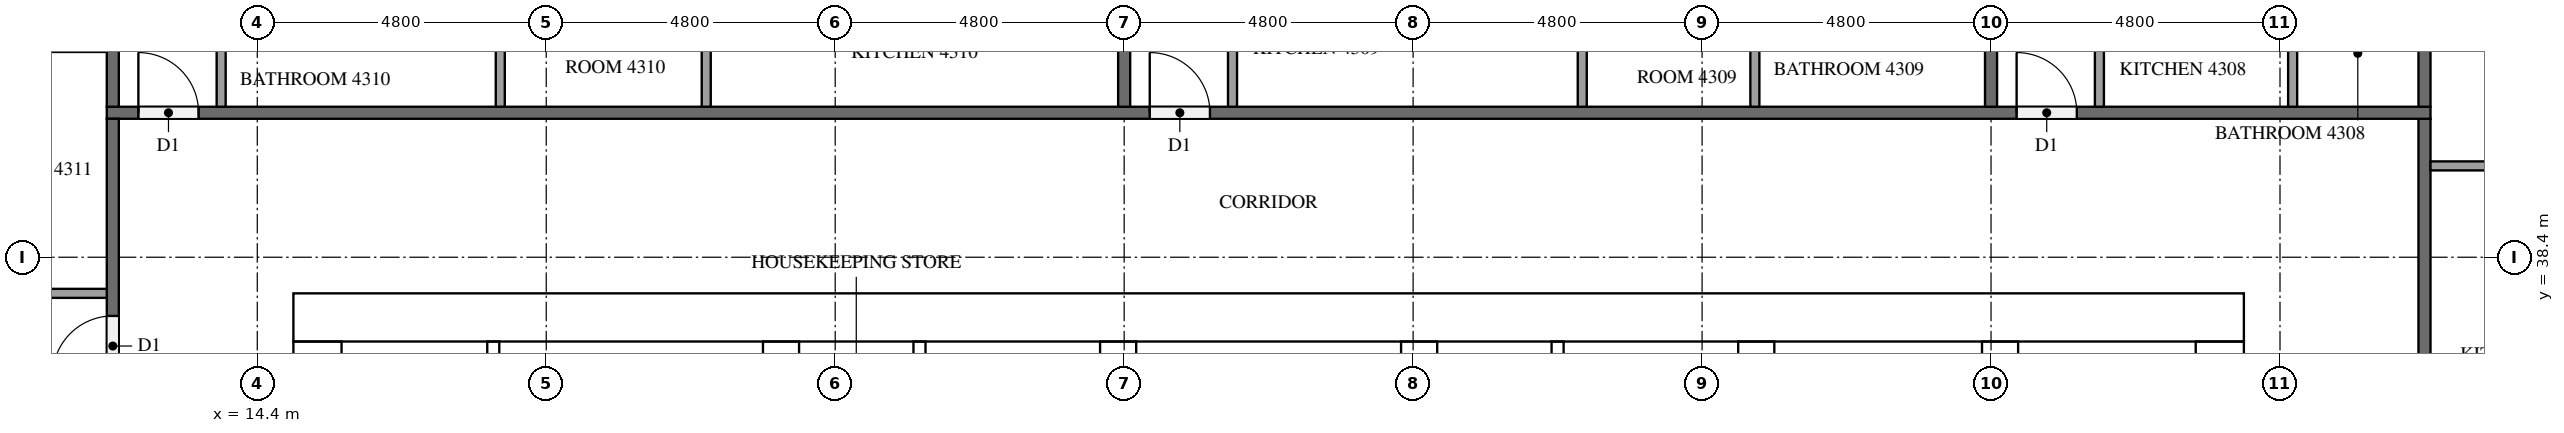
"""IFC4 building model, lengths in metres.
Left out: names, types, materials, properties, quantities, classifications, styles, units other than length and angle.
Written with IfcOpenShell. Run it as: python <this file> out.ifc"""

import sys

from ifc_helpers import new_model, si_unit, direction, frame, frame_2d, origin, place, context, subcontext, project, spatial, rectangle, extrude, element, fill, save


model = new_model("IFC4")
c1 = context("Model", 3, precision=1e-05, world=origin(), true_north=direction((0.0, 1.0)))
c2 = subcontext(c1, "Body", "Model", "MODEL_VIEW")
j1 = project(units=[si_unit("LENGTHUNIT", "METRE"), si_unit("PLANEANGLEUNIT", "RADIAN")], contexts=[c1])
p1 = place(None, origin())
s1 = spatial("IfcSite", under=j1, at=p1, CompositionType="ELEMENT")
p2 = place(p1, origin())
s2 = spatial("IfcBuilding", under=s1, at=p2, CompositionType="ELEMENT")
p3 = place(p2, frame((0.0, 0.0, 166.5)))
s3 = spatial("IfcBuildingStorey", under=s2, at=p3, CompositionType="ELEMENT", Elevation=166.5)
p4 = place(p3, frame((15.0, 37.4, 0.0), z_axis=(0.0, 0.0, 1.0), x_axis=(1.0, 0.0, 0.0)))
e1 = element("IfcWall", 1, at=p4, inside=s3, PredefinedType="SHEAR", context=c2, shape_type="SweptSolid", body=[
    extrude(rectangle(XDim=32.4, YDim=0.8, at=frame_2d((16.2, 0.0))), origin(), (0.0, 0.0, 1.0), 3.2),
])
p5 = place(p4, frame((15.3, 0.0, 0.0)))
e2 = element("IfcOpeningElement", 2, at=p5, cuts=e1, PredefinedType="OPENING", context=c2, shape_type="SweptSolid", body=[
    extrude(rectangle(XDim=1.8, YDim=2.1, at=frame_2d((0.9, 1.05))), frame((0.0, 0.41, 0.0), z_axis=(0.0, -1.0, 0.0), x_axis=(1.0, 0.0, 0.0)), (0.0, 0.0, 1.0), 0.82),
])
p6 = place(p4, frame((1.51, 0.0, 0.0)))
e3 = element("IfcOpeningElement", 3, at=p6, cuts=e1, PredefinedType="OPENING", context=c2, shape_type="SweptSolid", body=[
    extrude(rectangle(XDim=1.0, YDim=2.1, at=frame_2d((0.5, 1.05))), frame((0.0, 0.41, 0.0), z_axis=(0.0, -1.0, 0.0), x_axis=(1.0, 0.0, 0.0)), (0.0, 0.0, 1.0), 0.82),
])
p7 = place(p4, frame((5.11, 0.0, 0.0)))
e4 = element("IfcOpeningElement", 4, at=p7, cuts=e1, PredefinedType="OPENING", context=c2, shape_type="SweptSolid", body=[
    extrude(rectangle(XDim=1.0, YDim=2.1, at=frame_2d((0.5, 1.05))), frame((0.0, 0.41, 0.0), z_axis=(0.0, -1.0, 0.0), x_axis=(1.0, 0.0, 0.0)), (0.0, 0.0, 1.0), 0.82),
])
p8 = place(p3, frame((15.4, 15.8, 0.0), z_axis=(0.0, 0.0, 1.0), x_axis=(0.0, 1.0, 0.0)))
e5 = element("IfcWall", 5, at=p8, inside=s3, PredefinedType="SHEAR", context=c2, shape_type="SweptSolid", body=[
    extrude(rectangle(XDim=21.2, YDim=0.8, at=frame_2d((10.6, 0.0))), origin(), (0.0, 0.0, 1.0), 3.2),
])
p9 = place(p8, frame((4.96, 0.0, 0.0)))
e6 = element("IfcOpeningElement", 6, at=p9, cuts=e5, PredefinedType="OPENING", context=c2, shape_type="SweptSolid", body=[
    extrude(rectangle(XDim=1.2, YDim=2.1, at=frame_2d((0.6, 1.05))), frame((0.0, 0.41, 0.0), z_axis=(0.0, -1.0, 0.0), x_axis=(1.0, 0.0, 0.0)), (0.0, 0.0, 1.0), 0.82),
])
p10 = place(p3, frame((47.0, 15.8, 0.0), z_axis=(0.0, 0.0, 1.0), x_axis=(0.0, 1.0, 0.0)))
e7 = element("IfcWall", 7, at=p10, inside=s3, PredefinedType="SHEAR", context=c2, shape_type="SweptSolid", body=[
    extrude(rectangle(XDim=21.2, YDim=0.8, at=frame_2d((10.6, 0.0))), origin(), (0.0, 0.0, 1.0), 3.2),
])
p11 = place(p10, frame((10.3, 0.0, 0.0)))
e8 = element("IfcOpeningElement", 8, at=p11, cuts=e7, PredefinedType="OPENING", context=c2, shape_type="SweptSolid", body=[
    extrude(rectangle(XDim=1.2, YDim=2.1, at=frame_2d((0.6, 1.05))), frame((0.0, 0.41, 0.0), z_axis=(0.0, -1.0, 0.0), x_axis=(1.0, 0.0, 0.0)), (0.0, 0.0, 1.0), 0.82),
])
p12 = place(p3, frame((23.1, 15.8, 0.0), z_axis=(0.0, 0.0, 1.0), x_axis=(0.0, 1.0, 0.0)))
e9 = element("IfcWall", 9, at=p12, inside=s3, PredefinedType="SHEAR", context=c2, shape_type="SweptSolid", body=[
    extrude(rectangle(XDim=21.2, YDim=0.6, at=frame_2d((10.6, 0.0))), origin(), (0.0, 0.0, 1.0), 3.2),
])
p13 = place(p3, frame((39.3, 27.75, 0.0), z_axis=(0.0, 0.0, 1.0), x_axis=(0.0, 1.0, 0.0)))
e10 = element("IfcWall", 10, at=p13, inside=s3, PredefinedType="SHEAR", context=c2, shape_type="SweptSolid", body=[
    extrude(rectangle(XDim=9.25, YDim=0.6, at=frame_2d((4.625, 0.0))), origin(), (0.0, 0.0, 1.0), 3.2),
])
p14 = place(p3, frame((43.35, 27.75, 0.0), z_axis=(0.0, 0.0, 1.0), x_axis=(0.0, 1.0, 0.0)))
e11 = element("IfcWall", 11, at=p14, inside=s3, PredefinedType="SHEAR", context=c2, shape_type="SweptSolid", body=[
    extrude(rectangle(XDim=9.25, YDim=0.6, at=frame_2d((4.625, 0.0))), origin(), (0.0, 0.0, 1.0), 3.2),
])
p15 = place(p14, frame((7.65, 0.0, 0.0)))
e12 = element("IfcOpeningElement", 12, at=p15, cuts=e11, PredefinedType="OPENING", context=c2, shape_type="SweptSolid", body=[
    extrude(rectangle(XDim=1.2, YDim=2.1, at=frame_2d((0.6, 1.05))), frame((0.0, 0.31, 0.0), z_axis=(0.0, -1.0, 0.0), x_axis=(1.0, 0.0, 0.0)), (0.0, 0.0, 1.0), 0.62),
])
for number, where, z_axis, x_axis in (
    (13, (28.7, 33.85, 0.0), (0.0, 0.0, 1.0), (0.0, 1.0, 0.0)),
    (14, (33.7, 33.85, 0.0), (0.0, 0.0, 1.0), (0.0, 1.0, 0.0)),
):
    element("IfcWall", number, at=place(p3, frame(where, z_axis=z_axis, x_axis=x_axis)), inside=s3, PredefinedType="SHEAR", context=c2, shape_type="SweptSolid", body=[
        extrude(rectangle(XDim=3.15, YDim=0.6, at=frame_2d((1.575, 0.0))), origin(), (0.0, 0.0, 1.0), 3.2),
    ])
p16 = place(p3, frame((18.32, 31.55, 0.0), z_axis=(0.0, 0.0, 1.0), x_axis=(0.0, 1.0, 0.0)))
e15 = element("IfcWall", 15, at=p16, inside=s3, PredefinedType="PARTITIONING", context=c2, shape_type="SweptSolid", body=[
    extrude(rectangle(XDim=5.45, YDim=0.2, at=frame_2d((2.725, 0.0))), origin(), (0.0, 0.0, 1.0), 3.2),
])
for number, where, z_axis, x_axis in (
    (16, (25.4, 33.85, 0.0), (0.0, 0.0, 1.0), (0.0, 1.0, 0.0)),
    (17, (36.0, 33.85, 0.0), (0.0, 0.0, 1.0), (0.0, 1.0, 0.0)),
):
    element("IfcWall", number, at=place(p3, frame(where, z_axis=z_axis, x_axis=x_axis)), inside=s3, PredefinedType="PARTITIONING", context=c2, shape_type="SweptSolid", body=[
        extrude(rectangle(XDim=3.15, YDim=0.2, at=frame_2d((1.575, 0.0))), origin(), (0.0, 0.0, 1.0), 3.2),
    ])
p17 = place(p3, frame((50.4, 40.7, 0.0), z_axis=(0.0, 0.0, 1.0), x_axis=(0.0, -1.0, 0.0)))
e18 = element("IfcWall", 18, at=p17, inside=s3, PredefinedType="PARTITIONING", context=c2, shape_type="SweptSolid", body=[
    extrude(rectangle(XDim=28.6, YDim=0.2, at=frame_2d((14.3, 0.0))), origin(), (0.0, 0.0, 1.0), 3.2),
])
p18 = place(p17, frame((19.525, 0.0, 0.0)))
e19 = element("IfcOpeningElement", 19, at=p18, cuts=e18, PredefinedType="OPENING", context=c2, shape_type="SweptSolid", body=[
    extrude(rectangle(XDim=1.0, YDim=2.1, at=frame_2d((0.5, 1.05))), frame((0.0, 0.11, 0.0), z_axis=(0.0, -1.0, 0.0), x_axis=(1.0, 0.0, 0.0)), (0.0, 0.0, 1.0), 0.22),
])
p19 = place(p17, frame((17.675, 0.0, 0.0)))
e20 = element("IfcOpeningElement", 20, at=p19, cuts=e18, PredefinedType="OPENING", context=c2, shape_type="SweptSolid", body=[
    extrude(rectangle(XDim=1.0, YDim=2.1, at=frame_2d((0.5, 1.05))), frame((0.0, 0.11, 0.0), z_axis=(0.0, -1.0, 0.0), x_axis=(1.0, 0.0, 0.0)), (0.0, 0.0, 1.0), 0.22),
])
p20 = place(p17, frame((8.075, 0.0, 0.0)))
e21 = element("IfcOpeningElement", 21, at=p20, cuts=e18, PredefinedType="OPENING", context=c2, shape_type="SweptSolid", body=[
    extrude(rectangle(XDim=1.0, YDim=2.1, at=frame_2d((0.5, 1.05))), frame((0.0, 0.11, 0.0), z_axis=(0.0, -1.0, 0.0), x_axis=(1.0, 0.0, 0.0)), (0.0, 0.0, 1.0), 0.22),
])
p21 = place(p3, frame((11.9, 40.8, 0.0), z_axis=(0.0, 0.0, 1.0), x_axis=(1.0, 0.0, 0.0)))
e22 = element("IfcWall", 22, at=p21, inside=s3, PredefinedType="PARTITIONING", context=c2, shape_type="SweptSolid", body=[
    extrude(rectangle(XDim=38.6, YDim=0.2, at=frame_2d((19.3, 0.0))), origin(), (0.0, 0.0, 1.0), 3.2),
])
p22 = place(p21, frame((31.725, 0.0, 0.0)))
e23 = element("IfcOpeningElement", 23, at=p22, cuts=e22, PredefinedType="OPENING", context=c2, shape_type="SweptSolid", body=[
    extrude(rectangle(XDim=1.0, YDim=2.1, at=frame_2d((0.5, 1.05))), frame((0.0, 0.11, 0.0), z_axis=(0.0, -1.0, 0.0), x_axis=(1.0, 0.0, 0.0)), (0.0, 0.0, 1.0), 0.22),
])
p23 = place(p21, frame((17.325, 0.0, 0.0)))
e24 = element("IfcOpeningElement", 24, at=p23, cuts=e22, PredefinedType="OPENING", context=c2, shape_type="SweptSolid", body=[
    extrude(rectangle(XDim=1.0, YDim=2.1, at=frame_2d((0.5, 1.05))), frame((0.0, 0.11, 0.0), z_axis=(0.0, -1.0, 0.0), x_axis=(1.0, 0.0, 0.0)), (0.0, 0.0, 1.0), 0.22),
])
p24 = place(p21, frame((0.525, 0.0, 0.0)))
e25 = element("IfcOpeningElement", 25, at=p24, cuts=e22, PredefinedType="OPENING", context=c2, shape_type="SweptSolid", body=[
    extrude(rectangle(XDim=1.0, YDim=2.1, at=frame_2d((0.5, 1.05))), frame((0.0, 0.11, 0.0), z_axis=(0.0, -1.0, 0.0), x_axis=(1.0, 0.0, 0.0)), (0.0, 0.0, 1.0), 0.22),
])
p25 = place(p3, frame((12.0, 12.1, 0.0), z_axis=(0.0, 0.0, 1.0), x_axis=(0.0, 1.0, 0.0)))
e26 = element("IfcWall", 26, at=p25, inside=s3, PredefinedType="PARTITIONING", context=c2, shape_type="SweptSolid", body=[
    extrude(rectangle(XDim=28.6, YDim=0.2, at=frame_2d((14.3, 0.0))), origin(), (0.0, 0.0, 1.0), 3.2),
])
p26 = place(p25, frame((24.325, 0.0, 0.0)))
e27 = element("IfcOpeningElement", 27, at=p26, cuts=e26, PredefinedType="OPENING", context=c2, shape_type="SweptSolid", body=[
    extrude(rectangle(XDim=1.0, YDim=2.1, at=frame_2d((0.5, 1.05))), frame((0.0, 0.11, 0.0), z_axis=(0.0, -1.0, 0.0), x_axis=(1.0, 0.0, 0.0)), (0.0, 0.0, 1.0), 0.22),
])
p27 = place(p25, frame((22.475, 0.0, 0.0)))
e28 = element("IfcOpeningElement", 28, at=p27, cuts=e26, PredefinedType="OPENING", context=c2, shape_type="SweptSolid", body=[
    extrude(rectangle(XDim=1.0, YDim=2.1, at=frame_2d((0.5, 1.05))), frame((0.0, 0.11, 0.0), z_axis=(0.0, -1.0, 0.0), x_axis=(1.0, 0.0, 0.0)), (0.0, 0.0, 1.0), 0.22),
])
p28 = place(p25, frame((0.325, 0.0, 0.0)))
e29 = element("IfcOpeningElement", 29, at=p28, cuts=e26, PredefinedType="OPENING", context=c2, shape_type="SweptSolid", body=[
    extrude(rectangle(XDim=1.0, YDim=2.1, at=frame_2d((0.5, 1.05))), frame((0.0, 0.11, 0.0), z_axis=(0.0, -1.0, 0.0), x_axis=(1.0, 0.0, 0.0)), (0.0, 0.0, 1.0), 0.22),
])
p29 = place(p3, frame((50.4, 40.9, 0.0), z_axis=(0.0, 0.0, 1.0), x_axis=(0.0, 1.0, 0.0)))
e30 = element("IfcWall", 30, at=p29, inside=s3, PredefinedType="PARTITIONING", context=c2, shape_type="SweptSolid", body=[
    extrude(rectangle(XDim=7.0, YDim=0.2, at=frame_2d((3.5, 0.0))), origin(), (0.0, 0.0, 1.0), 3.2),
])
p30 = place(p3, frame((43.2, 47.625, 0.0), z_axis=(0.0, 0.0, 1.0), x_axis=(0.0, -1.0, 0.0)))
e31 = element("IfcWall", 31, at=p30, inside=s3, PredefinedType="PARTITIONING", context=c2, shape_type="SweptSolid", body=[
    extrude(rectangle(XDim=6.725, YDim=0.2, at=frame_2d((3.363, 0.0))), origin(), (0.0, 0.0, 1.0), 3.2),
])
for number, where, z_axis, x_axis in (
    (32, (28.8, 47.9, 0.0), (0.0, 0.0, 1.0), (0.0, -1.0, 0.0)),
    (33, (12.0, 47.9, 0.0), (0.0, 0.0, 1.0), (0.0, -1.0, 0.0)),
):
    element("IfcWall", number, at=place(p3, frame(where, z_axis=z_axis, x_axis=x_axis)), inside=s3, PredefinedType="PARTITIONING", context=c2, shape_type="SweptSolid", body=[
        extrude(rectangle(XDim=7.0, YDim=0.2, at=frame_2d((3.5, 0.0))), origin(), (0.0, 0.0, 1.0), 3.2),
    ])
p31 = place(p3, frame((50.5, 39.917, 0.0), z_axis=(0.0, 0.0, 1.0), x_axis=(1.0, 0.0, 0.0)))
e34 = element("IfcWall", 34, at=p31, inside=s3, PredefinedType="PARTITIONING", context=c2, shape_type="SweptSolid", body=[
    extrude(rectangle(XDim=2.375, YDim=0.15, at=frame_2d((1.188, 0.0))), origin(), (0.0, 0.0, 1.0), 3.2),
])
p32 = place(p3, frame((48.21, 40.9, 0.0), z_axis=(0.0, 0.0, 1.0), x_axis=(0.0, 1.0, 0.0)))
e35 = element("IfcWall", 35, at=p32, inside=s3, PredefinedType="PARTITIONING", context=c2, shape_type="SweptSolid", body=[
    extrude(rectangle(XDim=1.775, YDim=0.15, at=frame_2d((0.888, 0.0))), origin(), (0.0, 0.0, 1.0), 3.2),
])
for number, where, z_axis, x_axis in (
    (36, (45.0, 40.9, 0.0), (0.0, 0.0, 1.0), (0.0, 1.0, 0.0)),
    (37, (36.41, 40.9, 0.0), (0.0, 0.0, 1.0), (0.0, 1.0, 0.0)),
    (38, (39.277, 40.9, 0.0), (0.0, 0.0, 1.0), (0.0, 1.0, 0.0)),
):
    element("IfcWall", number, at=place(p3, frame(where, z_axis=z_axis, x_axis=x_axis)), inside=s3, PredefinedType="PARTITIONING", context=c2, shape_type="SweptSolid", body=[
        extrude(rectangle(XDim=1.925, YDim=0.15, at=frame_2d((0.962, 0.0))), origin(), (0.0, 0.0, 1.0), 3.2),
    ])
p33 = place(p3, frame((30.6, 40.9, 0.0), z_axis=(0.0, 0.0, 1.0), x_axis=(0.0, 1.0, 0.0)))
e39 = element("IfcWall", 39, at=p33, inside=s3, PredefinedType="PARTITIONING", context=c2, shape_type="SweptSolid", body=[
    extrude(rectangle(XDim=2.075, YDim=0.15, at=frame_2d((1.038, 0.0))), origin(), (0.0, 0.0, 1.0), 3.2),
])
for number, where, z_axis, x_axis in (
    (40, (18.437, 40.9, 0.0), (0.0, 0.0, 1.0), (0.0, 1.0, 0.0)),
    (41, (21.858, 40.9, 0.0), (0.0, 0.0, 1.0), (0.0, 1.0, 0.0)),
):
    element("IfcWall", number, at=place(p3, frame(where, z_axis=z_axis, x_axis=x_axis)), inside=s3, PredefinedType="PARTITIONING", context=c2, shape_type="SweptSolid", body=[
        extrude(rectangle(XDim=1.775, YDim=0.15, at=frame_2d((0.888, 0.0))), origin(), (0.0, 0.0, 1.0), 3.2),
    ])
p34 = place(p3, frame((13.8, 40.9, 0.0), z_axis=(0.0, 0.0, 1.0), x_axis=(0.0, 1.0, 0.0)))
e42 = element("IfcWall", 42, at=p34, inside=s3, PredefinedType="PARTITIONING", context=c2, shape_type="SweptSolid", body=[
    extrude(rectangle(XDim=1.925, YDim=0.15, at=frame_2d((0.962, 0.0))), origin(), (0.0, 0.0, 1.0), 3.2),
])
p35 = place(p3, frame((11.9, 37.8, 0.0), z_axis=(0.0, 0.0, 1.0), x_axis=(-1.0, 0.0, 0.0)))
e43 = element("IfcWall", 43, at=p35, inside=s3, PredefinedType="PARTITIONING", context=c2, shape_type="SweptSolid", body=[
    extrude(rectangle(XDim=3.125, YDim=0.15, at=frame_2d((1.562, 0.0))), origin(), (0.0, 0.0, 1.0), 3.2),
])
p36 = place(p5, origin())
e44 = element("IfcDoor", 44, at=p36, inside=s3, OperationType="DOUBLE_DOOR_SINGLE_SWING", PredefinedType="DOOR", context=c2, shape_type="SweptSolid", body=[
    extrude(rectangle(XDim=1.8, YDim=2.1, at=frame_2d((0.9, 1.05))), frame((0.0, 0.025, 0.0), z_axis=(0.0, -1.0, 0.0), x_axis=(1.0, 0.0, 0.0)), (0.0, 0.0, 1.0), 0.05),
])
fill(e2, e44)
p37 = place(p6, origin())
e45 = element("IfcDoor", 45, at=p37, inside=s3, OperationType="SINGLE_SWING_RIGHT", PredefinedType="DOOR", context=c2, shape_type="SweptSolid", body=[
    extrude(rectangle(XDim=1.0, YDim=2.1, at=frame_2d((0.5, 1.05))), frame((0.0, 0.025, 0.0), z_axis=(0.0, -1.0, 0.0), x_axis=(1.0, 0.0, 0.0)), (0.0, 0.0, 1.0), 0.05),
])
fill(e3, e45)
p38 = place(p7, origin())
e46 = element("IfcDoor", 46, at=p38, inside=s3, OperationType="SINGLE_SWING_LEFT", PredefinedType="DOOR", context=c2, shape_type="SweptSolid", body=[
    extrude(rectangle(XDim=1.0, YDim=2.1, at=frame_2d((0.5, 1.05))), frame((0.0, 0.025, 0.0), z_axis=(0.0, -1.0, 0.0), x_axis=(1.0, 0.0, 0.0)), (0.0, 0.0, 1.0), 0.05),
])
fill(e4, e46)
p39 = place(p22, origin())
e47 = element("IfcDoor", 47, at=p39, inside=s3, OperationType="SINGLE_SWING_LEFT", PredefinedType="DOOR", context=c2, shape_type="SweptSolid", body=[
    extrude(rectangle(XDim=1.0, YDim=2.1, at=frame_2d((0.5, 1.05))), frame((0.0, 0.025, 0.0), z_axis=(0.0, -1.0, 0.0), x_axis=(1.0, 0.0, 0.0)), (0.0, 0.0, 1.0), 0.05),
])
fill(e23, e47)
p40 = place(p23, origin())
e48 = element("IfcDoor", 48, at=p40, inside=s3, OperationType="SINGLE_SWING_LEFT", PredefinedType="DOOR", context=c2, shape_type="SweptSolid", body=[
    extrude(rectangle(XDim=1.0, YDim=2.1, at=frame_2d((0.5, 1.05))), frame((0.0, 0.025, 0.0), z_axis=(0.0, -1.0, 0.0), x_axis=(1.0, 0.0, 0.0)), (0.0, 0.0, 1.0), 0.05),
])
fill(e24, e48)
p41 = place(p24, origin())
e49 = element("IfcDoor", 49, at=p41, inside=s3, OperationType="SINGLE_SWING_LEFT", PredefinedType="DOOR", context=c2, shape_type="SweptSolid", body=[
    extrude(rectangle(XDim=1.0, YDim=2.1, at=frame_2d((0.5, 1.05))), frame((0.0, 0.025, 0.0), z_axis=(0.0, -1.0, 0.0), x_axis=(1.0, 0.0, 0.0)), (0.0, 0.0, 1.0), 0.05),
])
fill(e25, e49)
p42 = place(p26, origin())
e50 = element("IfcDoor", 50, at=p42, inside=s3, OperationType="SINGLE_SWING_LEFT", PredefinedType="DOOR", context=c2, shape_type="SweptSolid", body=[
    extrude(rectangle(XDim=1.0, YDim=2.1, at=frame_2d((0.5, 1.05))), frame((0.0, 0.025, 0.0), z_axis=(0.0, -1.0, 0.0), x_axis=(1.0, 0.0, 0.0)), (0.0, 0.0, 1.0), 0.05),
])
fill(e27, e50)
save(model, sys.argv[1])
